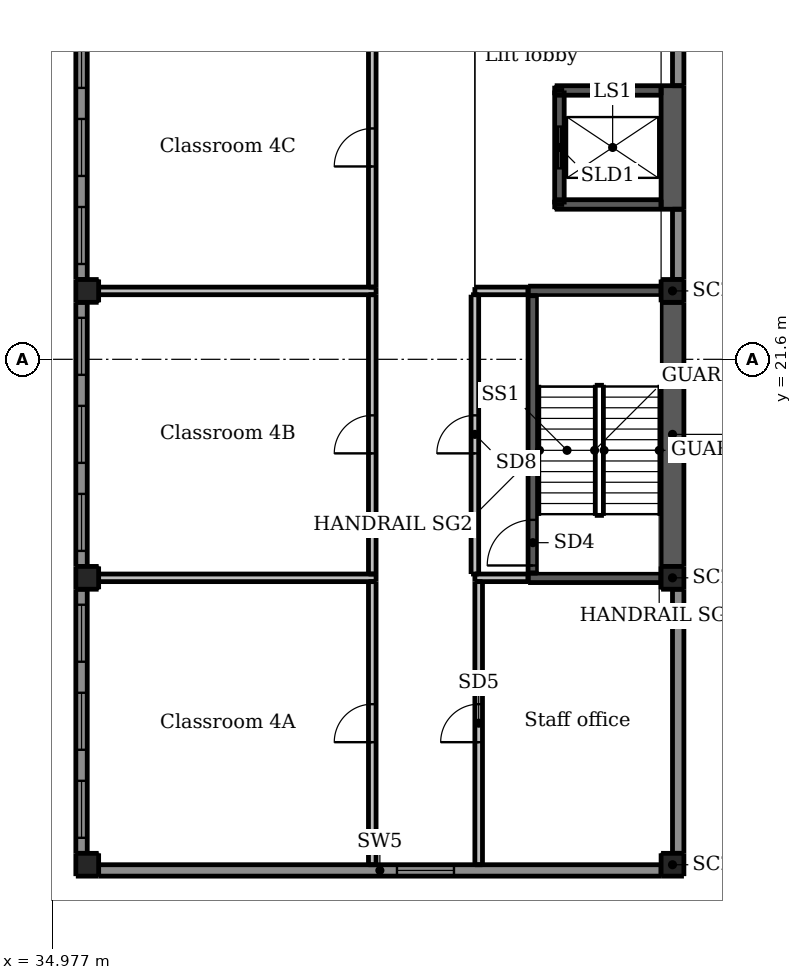
"""IFC4 building model, lengths in metres.
Left out: names, types, materials, properties, quantities, classifications, styles, units other than length and angle.
Written with IfcOpenShell. Run it as: python <this file> out.ifc"""

import sys

from ifc_helpers import new_model, si_unit, direction, frame, frame_2d, origin, origin_2d, place, context, subcontext, project, spatial, rectangle, extrude, element, fill, save


model = new_model("IFC4")
c1 = context("Model", 3, precision=1e-05, world=origin(), true_north=direction((0.0, 1.0)))
c2 = subcontext(c1, "Body", "Model", "MODEL_VIEW")
j1 = project(units=[si_unit("LENGTHUNIT", "METRE"), si_unit("PLANEANGLEUNIT", "RADIAN")], contexts=[c1])
p1 = place(None, origin())
s1 = spatial("IfcSite", under=j1, at=p1, CompositionType="ELEMENT")
p2 = place(p1, origin())
s2 = spatial("IfcBuilding", under=s1, at=p2, CompositionType="ELEMENT")
p3 = place(p2, frame((0.0, 0.0, 19.0)))
s3 = spatial("IfcBuildingStorey", under=s2, at=p3, CompositionType="ELEMENT", Elevation=19.0)
for number, where, z_axis, x_axis in (
    (1, (35.9, 8.3, -0.3), (0.0, 0.0, 1.0), (1.0, 0.0, 0.0)),
    (2, (51.3, 8.3, -0.3), (0.0, 0.0, 1.0), (1.0, 0.0, 0.0)),
    (3, (35.9, 15.85, -0.3), (0.0, 0.0, 1.0), (1.0, 0.0, 0.0)),
    (4, (51.3, 15.85, -0.3), (0.0, 0.0, 1.0), (1.0, 0.0, 0.0)),
    (5, (35.9, 23.4, -0.3), (0.0, 0.0, 1.0), (1.0, 0.0, 0.0)),
    (6, (51.3, 23.4, -0.3), (0.0, 0.0, 1.0), (1.0, 0.0, 0.0)),
):
    element("IfcColumn", number, at=place(p3, frame(where, z_axis=z_axis, x_axis=x_axis)), inside=s3, PredefinedType="COLUMN", context=c2, shape_type="SweptSolid", body=[
        extrude(rectangle(XDim=0.6, YDim=0.6, at=origin_2d()), origin(), (0.0, 0.0, 1.0), 4.35),
    ])
p4 = place(p3, frame((47.625, 15.975, -0.3), z_axis=(0.0, 0.0, 1.0), x_axis=(0.0, 1.0, 0.0)))
e7 = element("IfcWall", 7, at=p4, inside=s3, PredefinedType="SHEAR", context=c2, shape_type="SweptSolid", body=[
    extrude(rectangle(XDim=7.3, YDim=0.25, at=frame_2d((3.65, 0.0))), origin(), (0.0, 0.0, 1.0), 4.8),
])
p5 = place(p4, frame((0.2, 0.0, 0.3)))
e8 = element("IfcOpeningElement", 8, at=p5, cuts=e7, PredefinedType="OPENING", context=c2, shape_type="SweptSolid", body=[
    extrude(rectangle(XDim=1.2, YDim=2.1, at=frame_2d((0.6, 1.05))), frame((0.0, 0.135, 0.0), z_axis=(0.0, -1.0, 0.0), x_axis=(1.0, 0.0, 0.0)), (0.0, 0.0, 1.0), 0.27),
])
for number, where, z_axis, x_axis in (
    (9, (47.5, 15.85, -0.3), (0.0, 0.0, 1.0), (1.0, 0.0, 0.0)),
    (10, (47.5, 23.4, -0.3), (0.0, 0.0, 1.0), (1.0, 0.0, 0.0)),
):
    element("IfcWall", number, at=place(p3, frame(where, z_axis=z_axis, x_axis=x_axis)), inside=s3, PredefinedType="SHEAR", context=c2, shape_type="SweptSolid", body=[
        extrude(rectangle(XDim=3.5, YDim=0.25, at=frame_2d((1.75, 0.0))), origin(), (0.0, 0.0, 1.0), 4.8),
    ])
p6 = place(p3, frame((51.3, 16.15, -0.3), z_axis=(0.0, 0.0, 1.0), x_axis=(0.0, 1.0, 0.0)))
e11 = element("IfcWall", 11, at=p6, inside=s3, PredefinedType="SHEAR", context=c2, shape_type="SweptSolid", body=[
    extrude(rectangle(XDim=6.95, YDim=0.6, at=frame_2d((3.475, 0.0))), origin(), (0.0, 0.0, 1.0), 4.8),
])
p7 = place(p3, frame((48.325, 25.675, -0.3), z_axis=(0.0, 0.0, 1.0), x_axis=(0.0, 1.0, 0.0)))
e12 = element("IfcWall", 12, at=p7, inside=s3, PredefinedType="SHEAR", context=c2, shape_type="SweptSolid", body=[
    extrude(rectangle(XDim=3.0, YDim=0.25, at=frame_2d((1.5, 0.0))), origin(), (0.0, 0.0, 1.0), 4.35),
])
p8 = place(p7, frame((0.95, 0.0, 0.3)))
e13 = element("IfcOpeningElement", 13, at=p8, cuts=e12, PredefinedType="OPENING", context=c2, shape_type="SweptSolid", body=[
    extrude(rectangle(XDim=1.1, YDim=2.1, at=frame_2d((0.55, 1.05))), frame((0.0, 0.135, 0.0), z_axis=(0.0, -1.0, 0.0), x_axis=(1.0, 0.0, 0.0)), (0.0, 0.0, 1.0), 0.27),
])
for number, where, z_axis, x_axis in (
    (14, (48.2, 25.675, -0.3), (0.0, 0.0, 1.0), (1.0, 0.0, 0.0)),
    (15, (48.2, 28.675, -0.3), (0.0, 0.0, 1.0), (1.0, 0.0, 0.0)),
):
    element("IfcWall", number, at=place(p3, frame(where, z_axis=z_axis, x_axis=x_axis)), inside=s3, PredefinedType="SHEAR", context=c2, shape_type="SweptSolid", body=[
        extrude(rectangle(XDim=2.8, YDim=0.25, at=frame_2d((1.4, 0.0))), origin(), (0.0, 0.0, 1.0), 4.35),
    ])
p9 = place(p3, frame((51.3, 25.55, -0.3), z_axis=(0.0, 0.0, 1.0), x_axis=(0.0, 1.0, 0.0)))
e16 = element("IfcWall", 16, at=p9, inside=s3, PredefinedType="SHEAR", context=c2, shape_type="SweptSolid", body=[
    extrude(rectangle(XDim=3.25, YDim=0.6, at=frame_2d((1.625, 0.0))), origin(), (0.0, 0.0, 1.0), 4.35),
])
p10 = place(p3, frame((52.125, 20.0, 0.0), z_axis=(0.0, 0.0, 1.0), x_axis=(0.0, 1.0, 0.0)))
e17 = element("IfcWall", 17, at=p10, inside=s3, PredefinedType="SOLIDWALL", context=c2, shape_type="SweptSolid", body=[
    extrude(rectangle(XDim=9.8, YDim=0.25, at=frame_2d((4.9, 0.0))), origin(), (0.0, 0.0, 1.0), 4.25),
])
p11 = place(p3, frame((35.75, 8.6, 0.0), z_axis=(0.0, 0.0, 1.0), x_axis=(0.0, 1.0, 0.0)))
e18 = element("IfcWall", 18, at=p11, inside=s3, PredefinedType="SOLIDWALL", context=c2, shape_type="SweptSolid", body=[
    extrude(rectangle(XDim=6.95, YDim=0.3, at=frame_2d((3.475, 0.0))), origin(), (0.0, 0.0, 1.0), 3.15),
])
p12 = place(p11, frame((0.408, 0.0, 0.9)))
e19 = element("IfcOpeningElement", 19, at=p12, cuts=e18, PredefinedType="OPENING", context=c2, shape_type="SweptSolid", body=[
    extrude(rectangle(XDim=1.5, YDim=1.5, at=frame_2d((0.75, 0.75))), frame((0.0, 0.16, 0.0), z_axis=(0.0, -1.0, 0.0), x_axis=(1.0, 0.0, 0.0)), (0.0, 0.0, 1.0), 0.32),
])
p13 = place(p11, frame((2.725, 0.0, 0.9)))
e20 = element("IfcOpeningElement", 20, at=p13, cuts=e18, PredefinedType="OPENING", context=c2, shape_type="SweptSolid", body=[
    extrude(rectangle(XDim=1.5, YDim=1.5, at=frame_2d((0.75, 0.75))), frame((0.0, 0.16, 0.0), z_axis=(0.0, -1.0, 0.0), x_axis=(1.0, 0.0, 0.0)), (0.0, 0.0, 1.0), 0.32),
])
p14 = place(p11, frame((5.042, 0.0, 0.9)))
e21 = element("IfcOpeningElement", 21, at=p14, cuts=e18, PredefinedType="OPENING", context=c2, shape_type="SweptSolid", body=[
    extrude(rectangle(XDim=1.5, YDim=1.5, at=frame_2d((0.75, 0.75))), frame((0.0, 0.16, 0.0), z_axis=(0.0, -1.0, 0.0), x_axis=(1.0, 0.0, 0.0)), (0.0, 0.0, 1.0), 0.32),
])
p15 = place(p3, frame((35.75, 16.15, 0.0), z_axis=(0.0, 0.0, 1.0), x_axis=(0.0, 1.0, 0.0)))
e22 = element("IfcWall", 22, at=p15, inside=s3, PredefinedType="SOLIDWALL", context=c2, shape_type="SweptSolid", body=[
    extrude(rectangle(XDim=6.95, YDim=0.3, at=frame_2d((3.475, 0.0))), origin(), (0.0, 0.0, 1.0), 3.15),
])
p16 = place(p15, frame((0.408, 0.0, 0.9)))
e23 = element("IfcOpeningElement", 23, at=p16, cuts=e22, PredefinedType="OPENING", context=c2, shape_type="SweptSolid", body=[
    extrude(rectangle(XDim=1.5, YDim=1.5, at=frame_2d((0.75, 0.75))), frame((0.0, 0.16, 0.0), z_axis=(0.0, -1.0, 0.0), x_axis=(1.0, 0.0, 0.0)), (0.0, 0.0, 1.0), 0.32),
])
p17 = place(p15, frame((2.725, 0.0, 0.9)))
e24 = element("IfcOpeningElement", 24, at=p17, cuts=e22, PredefinedType="OPENING", context=c2, shape_type="SweptSolid", body=[
    extrude(rectangle(XDim=1.5, YDim=1.5, at=frame_2d((0.75, 0.75))), frame((0.0, 0.16, 0.0), z_axis=(0.0, -1.0, 0.0), x_axis=(1.0, 0.0, 0.0)), (0.0, 0.0, 1.0), 0.32),
])
p18 = place(p15, frame((5.042, 0.0, 0.9)))
e25 = element("IfcOpeningElement", 25, at=p18, cuts=e22, PredefinedType="OPENING", context=c2, shape_type="SweptSolid", body=[
    extrude(rectangle(XDim=1.5, YDim=1.5, at=frame_2d((0.75, 0.75))), frame((0.0, 0.16, 0.0), z_axis=(0.0, -1.0, 0.0), x_axis=(1.0, 0.0, 0.0)), (0.0, 0.0, 1.0), 0.32),
])
p19 = place(p3, frame((35.75, 23.7, 0.0), z_axis=(0.0, 0.0, 1.0), x_axis=(0.0, 1.0, 0.0)))
e26 = element("IfcWall", 26, at=p19, inside=s3, PredefinedType="SOLIDWALL", context=c2, shape_type="SweptSolid", body=[
    extrude(rectangle(XDim=6.95, YDim=0.3, at=frame_2d((3.475, 0.0))), origin(), (0.0, 0.0, 1.0), 3.15),
])
p20 = place(p19, frame((0.408, 0.0, 0.9)))
e27 = element("IfcOpeningElement", 27, at=p20, cuts=e26, PredefinedType="OPENING", context=c2, shape_type="SweptSolid", body=[
    extrude(rectangle(XDim=1.5, YDim=1.5, at=frame_2d((0.75, 0.75))), frame((0.0, 0.16, 0.0), z_axis=(0.0, -1.0, 0.0), x_axis=(1.0, 0.0, 0.0)), (0.0, 0.0, 1.0), 0.32),
])
p21 = place(p19, frame((2.725, 0.0, 0.9)))
e28 = element("IfcOpeningElement", 28, at=p21, cuts=e26, PredefinedType="OPENING", context=c2, shape_type="SweptSolid", body=[
    extrude(rectangle(XDim=1.5, YDim=1.5, at=frame_2d((0.75, 0.75))), frame((0.0, 0.16, 0.0), z_axis=(0.0, -1.0, 0.0), x_axis=(1.0, 0.0, 0.0)), (0.0, 0.0, 1.0), 0.32),
])
p22 = place(p19, frame((5.042, 0.0, 0.9)))
e29 = element("IfcOpeningElement", 29, at=p22, cuts=e26, PredefinedType="OPENING", context=c2, shape_type="SweptSolid", body=[
    extrude(rectangle(XDim=1.5, YDim=1.5, at=frame_2d((0.75, 0.75))), frame((0.0, 0.16, 0.0), z_axis=(0.0, -1.0, 0.0), x_axis=(1.0, 0.0, 0.0)), (0.0, 0.0, 1.0), 0.32),
])
p23 = place(p3, frame((36.2, 8.15, 0.0), z_axis=(0.0, 0.0, 1.0), x_axis=(1.0, 0.0, 0.0)))
e30 = element("IfcWall", 30, at=p23, inside=s3, PredefinedType="SOLIDWALL", context=c2, shape_type="SweptSolid", body=[
    extrude(rectangle(XDim=14.8, YDim=0.3, at=frame_2d((7.4, 0.0))), origin(), (0.0, 0.0, 1.0), 2.85),
])
p24 = place(p23, frame((7.85, 0.0, 0.9)))
e31 = element("IfcOpeningElement", 31, at=p24, cuts=e30, PredefinedType="OPENING", context=c2, shape_type="SweptSolid", body=[
    extrude(rectangle(XDim=1.5, YDim=1.5, at=frame_2d((0.75, 0.75))), frame((0.0, 0.16, 0.0), z_axis=(0.0, -1.0, 0.0), x_axis=(1.0, 0.0, 0.0)), (0.0, 0.0, 1.0), 0.32),
])
p25 = place(p3, frame((51.45, 8.6, 0.0), z_axis=(0.0, 0.0, 1.0), x_axis=(0.0, 1.0, 0.0)))
e32 = element("IfcWall", 32, at=p25, inside=s3, PredefinedType="SOLIDWALL", context=c2, shape_type="SweptSolid", body=[
    extrude(rectangle(XDim=6.95, YDim=0.3, at=frame_2d((3.475, 0.0))), origin(), (0.0, 0.0, 1.0), 3.15),
])
p26 = place(p3, frame((51.45, 23.7, 0.0), z_axis=(0.0, 0.0, 1.0), x_axis=(0.0, 1.0, 0.0)))
e33 = element("IfcWall", 33, at=p26, inside=s3, PredefinedType="SOLIDWALL", context=c2, shape_type="SweptSolid", body=[
    extrude(rectangle(XDim=1.85, YDim=0.3, at=frame_2d((0.925, 0.0))), origin(), (0.0, 0.0, 1.0), 3.15),
])
p27 = place(p3, frame((51.45, 28.8, 0.0), z_axis=(0.0, 0.0, 1.0), x_axis=(0.0, 1.0, 0.0)))
e34 = element("IfcWall", 34, at=p27, inside=s3, PredefinedType="SOLIDWALL", context=c2, shape_type="SweptSolid", body=[
    extrude(rectangle(XDim=1.85, YDim=0.3, at=frame_2d((0.925, 0.0))), origin(), (0.0, 0.0, 1.0), 3.15),
])
p28 = place(p3, frame((43.4, 8.3, 0.0), z_axis=(0.0, 0.0, 1.0), x_axis=(0.0, 1.0, 0.0)))
e35 = element("IfcWall", 35, at=p28, inside=s3, PredefinedType="PARTITIONING", context=c2, shape_type="SweptSolid", body=[
    extrude(rectangle(XDim=7.45, YDim=0.2, at=frame_2d((3.725, 0.0))), origin(), (0.0, 0.0, 1.0), 2.85),
])
p29 = place(p28, frame((3.225, 0.0, 0.0)))
e36 = element("IfcOpeningElement", 36, at=p29, cuts=e35, PredefinedType="OPENING", context=c2, shape_type="SweptSolid", body=[
    extrude(rectangle(XDim=1.0, YDim=2.1, at=frame_2d((0.5, 1.05))), frame((0.0, 0.11, 0.0), z_axis=(0.0, -1.0, 0.0), x_axis=(1.0, 0.0, 0.0)), (0.0, 0.0, 1.0), 0.22),
])
p30 = place(p3, frame((43.4, 15.95, 0.0), z_axis=(0.0, 0.0, 1.0), x_axis=(0.0, 1.0, 0.0)))
e37 = element("IfcWall", 37, at=p30, inside=s3, PredefinedType="PARTITIONING", context=c2, shape_type="SweptSolid", body=[
    extrude(rectangle(XDim=7.35, YDim=0.2, at=frame_2d((3.675, 0.0))), origin(), (0.0, 0.0, 1.0), 2.85),
])
p31 = place(p30, frame((3.175, 0.0, 0.0)))
e38 = element("IfcOpeningElement", 38, at=p31, cuts=e37, PredefinedType="OPENING", context=c2, shape_type="SweptSolid", body=[
    extrude(rectangle(XDim=1.0, YDim=2.1, at=frame_2d((0.5, 1.05))), frame((0.0, 0.11, 0.0), z_axis=(0.0, -1.0, 0.0), x_axis=(1.0, 0.0, 0.0)), (0.0, 0.0, 1.0), 0.22),
])
p32 = place(p3, frame((43.4, 23.5, 0.0), z_axis=(0.0, 0.0, 1.0), x_axis=(0.0, 1.0, 0.0)))
e39 = element("IfcWall", 39, at=p32, inside=s3, PredefinedType="PARTITIONING", context=c2, shape_type="SweptSolid", body=[
    extrude(rectangle(XDim=7.35, YDim=0.2, at=frame_2d((3.675, 0.0))), origin(), (0.0, 0.0, 1.0), 2.85),
])
p33 = place(p32, frame((3.175, 0.0, 0.0)))
e40 = element("IfcOpeningElement", 40, at=p33, cuts=e39, PredefinedType="OPENING", context=c2, shape_type="SweptSolid", body=[
    extrude(rectangle(XDim=1.0, YDim=2.1, at=frame_2d((0.5, 1.05))), frame((0.0, 0.11, 0.0), z_axis=(0.0, -1.0, 0.0), x_axis=(1.0, 0.0, 0.0)), (0.0, 0.0, 1.0), 0.22),
])
for number, where, z_axis, x_axis in (
    (41, (36.2, 15.85, 0.0), (0.0, 0.0, 1.0), (1.0, 0.0, 0.0)),
    (42, (36.2, 23.4, 0.0), (0.0, 0.0, 1.0), (1.0, 0.0, 0.0)),
):
    element("IfcWall", number, at=place(p3, frame(where, z_axis=z_axis, x_axis=x_axis)), inside=s3, PredefinedType="PARTITIONING", context=c2, shape_type="SweptSolid", body=[
        extrude(rectangle(XDim=7.3, YDim=0.2, at=frame_2d((3.65, 0.0))), origin(), (0.0, 0.0, 1.0), 2.85),
    ])
p34 = place(p3, frame((46.2, 8.3, 0.0), z_axis=(0.0, 0.0, 1.0), x_axis=(0.0, 1.0, 0.0)))
e43 = element("IfcWall", 43, at=p34, inside=s3, PredefinedType="PARTITIONING", context=c2, shape_type="SweptSolid", body=[
    extrude(rectangle(XDim=7.45, YDim=0.2, at=frame_2d((3.725, 0.0))), origin(), (0.0, 0.0, 1.0), 2.85),
])
p35 = place(p34, frame((3.225, 0.0, 0.0)))
e44 = element("IfcOpeningElement", 44, at=p35, cuts=e43, PredefinedType="OPENING", context=c2, shape_type="SweptSolid", body=[
    extrude(rectangle(XDim=1.0, YDim=2.1, at=frame_2d((0.5, 1.05))), frame((0.0, 0.11, 0.0), z_axis=(0.0, -1.0, 0.0), x_axis=(1.0, 0.0, 0.0)), (0.0, 0.0, 1.0), 0.22),
])
for number, where, z_axis, x_axis in (
    (45, (46.1, 15.85, 0.0), (0.0, 0.0, 1.0), (1.0, 0.0, 0.0)),
    (46, (46.1, 23.4, 0.0), (0.0, 0.0, 1.0), (1.0, 0.0, 0.0)),
):
    element("IfcWall", number, at=place(p3, frame(where, z_axis=z_axis, x_axis=x_axis)), inside=s3, PredefinedType="PARTITIONING", context=c2, shape_type="SweptSolid", body=[
        extrude(rectangle(XDim=1.4, YDim=0.2, at=frame_2d((0.7, 0.0))), origin(), (0.0, 0.0, 1.0), 2.85),
    ])
p36 = place(p3, frame((46.1, 15.95, 0.0), z_axis=(0.0, 0.0, 1.0), x_axis=(0.0, 1.0, 0.0)))
e47 = element("IfcWall", 47, at=p36, inside=s3, PredefinedType="PARTITIONING", context=c2, shape_type="SweptSolid", body=[
    extrude(rectangle(XDim=7.35, YDim=0.2, at=frame_2d((3.675, 0.0))), origin(), (0.0, 0.0, 1.0), 2.85),
])
p37 = place(p36, frame((3.175, 0.0, 0.0)))
e48 = element("IfcOpeningElement", 48, at=p37, cuts=e47, PredefinedType="OPENING", context=c2, shape_type="SweptSolid", body=[
    extrude(rectangle(XDim=1.0, YDim=2.1, at=frame_2d((0.5, 1.05))), frame((0.0, 0.11, 0.0), z_axis=(0.0, -1.0, 0.0), x_axis=(1.0, 0.0, 0.0)), (0.0, 0.0, 1.0), 0.22),
])
p38 = place(p12, origin())
e49 = element("IfcWindow", 49, at=p38, inside=s3, PartitioningType="DOUBLE_PANEL_HORIZONTAL", PredefinedType="WINDOW", context=c2, shape_type="SweptSolid", body=[
    extrude(rectangle(XDim=1.5, YDim=1.5, at=frame_2d((0.75, 0.75))), frame((0.0, 0.03, 0.0), z_axis=(0.0, -1.0, 0.0), x_axis=(1.0, 0.0, 0.0)), (0.0, 0.0, 1.0), 0.06),
])
fill(e19, e49)
p39 = place(p13, origin())
e50 = element("IfcWindow", 50, at=p39, inside=s3, PartitioningType="DOUBLE_PANEL_HORIZONTAL", PredefinedType="WINDOW", context=c2, shape_type="SweptSolid", body=[
    extrude(rectangle(XDim=1.5, YDim=1.5, at=frame_2d((0.75, 0.75))), frame((0.0, 0.03, 0.0), z_axis=(0.0, -1.0, 0.0), x_axis=(1.0, 0.0, 0.0)), (0.0, 0.0, 1.0), 0.06),
])
fill(e20, e50)
p40 = place(p14, origin())
e51 = element("IfcWindow", 51, at=p40, inside=s3, PartitioningType="DOUBLE_PANEL_HORIZONTAL", PredefinedType="WINDOW", context=c2, shape_type="SweptSolid", body=[
    extrude(rectangle(XDim=1.5, YDim=1.5, at=frame_2d((0.75, 0.75))), frame((0.0, 0.03, 0.0), z_axis=(0.0, -1.0, 0.0), x_axis=(1.0, 0.0, 0.0)), (0.0, 0.0, 1.0), 0.06),
])
fill(e21, e51)
p41 = place(p16, origin())
e52 = element("IfcWindow", 52, at=p41, inside=s3, PartitioningType="DOUBLE_PANEL_HORIZONTAL", PredefinedType="WINDOW", context=c2, shape_type="SweptSolid", body=[
    extrude(rectangle(XDim=1.5, YDim=1.5, at=frame_2d((0.75, 0.75))), frame((0.0, 0.03, 0.0), z_axis=(0.0, -1.0, 0.0), x_axis=(1.0, 0.0, 0.0)), (0.0, 0.0, 1.0), 0.06),
])
fill(e23, e52)
p42 = place(p17, origin())
e53 = element("IfcWindow", 53, at=p42, inside=s3, PartitioningType="DOUBLE_PANEL_HORIZONTAL", PredefinedType="WINDOW", context=c2, shape_type="SweptSolid", body=[
    extrude(rectangle(XDim=1.5, YDim=1.5, at=frame_2d((0.75, 0.75))), frame((0.0, 0.03, 0.0), z_axis=(0.0, -1.0, 0.0), x_axis=(1.0, 0.0, 0.0)), (0.0, 0.0, 1.0), 0.06),
])
fill(e24, e53)
p43 = place(p18, origin())
e54 = element("IfcWindow", 54, at=p43, inside=s3, PartitioningType="DOUBLE_PANEL_HORIZONTAL", PredefinedType="WINDOW", context=c2, shape_type="SweptSolid", body=[
    extrude(rectangle(XDim=1.5, YDim=1.5, at=frame_2d((0.75, 0.75))), frame((0.0, 0.03, 0.0), z_axis=(0.0, -1.0, 0.0), x_axis=(1.0, 0.0, 0.0)), (0.0, 0.0, 1.0), 0.06),
])
fill(e25, e54)
p44 = place(p20, origin())
e55 = element("IfcWindow", 55, at=p44, inside=s3, PartitioningType="DOUBLE_PANEL_HORIZONTAL", PredefinedType="WINDOW", context=c2, shape_type="SweptSolid", body=[
    extrude(rectangle(XDim=1.5, YDim=1.5, at=frame_2d((0.75, 0.75))), frame((0.0, 0.03, 0.0), z_axis=(0.0, -1.0, 0.0), x_axis=(1.0, 0.0, 0.0)), (0.0, 0.0, 1.0), 0.06),
])
fill(e27, e55)
p45 = place(p21, origin())
e56 = element("IfcWindow", 56, at=p45, inside=s3, PartitioningType="DOUBLE_PANEL_HORIZONTAL", PredefinedType="WINDOW", context=c2, shape_type="SweptSolid", body=[
    extrude(rectangle(XDim=1.5, YDim=1.5, at=frame_2d((0.75, 0.75))), frame((0.0, 0.03, 0.0), z_axis=(0.0, -1.0, 0.0), x_axis=(1.0, 0.0, 0.0)), (0.0, 0.0, 1.0), 0.06),
])
fill(e28, e56)
p46 = place(p22, origin())
e57 = element("IfcWindow", 57, at=p46, inside=s3, PartitioningType="DOUBLE_PANEL_HORIZONTAL", PredefinedType="WINDOW", context=c2, shape_type="SweptSolid", body=[
    extrude(rectangle(XDim=1.5, YDim=1.5, at=frame_2d((0.75, 0.75))), frame((0.0, 0.03, 0.0), z_axis=(0.0, -1.0, 0.0), x_axis=(1.0, 0.0, 0.0)), (0.0, 0.0, 1.0), 0.06),
])
fill(e29, e57)
p47 = place(p24, origin())
e58 = element("IfcWindow", 58, at=p47, inside=s3, PartitioningType="DOUBLE_PANEL_HORIZONTAL", PredefinedType="WINDOW", context=c2, shape_type="SweptSolid", body=[
    extrude(rectangle(XDim=1.5, YDim=1.5, at=frame_2d((0.75, 0.75))), frame((0.0, 0.03, 0.0), z_axis=(0.0, -1.0, 0.0), x_axis=(1.0, 0.0, 0.0)), (0.0, 0.0, 1.0), 0.06),
])
fill(e31, e58)
p48 = place(p29, origin())
e59 = element("IfcDoor", 59, at=p48, inside=s3, OperationType="SINGLE_SWING_LEFT", PredefinedType="DOOR", context=c2, shape_type="SweptSolid", body=[
    extrude(rectangle(XDim=1.0, YDim=2.1, at=frame_2d((0.5, 1.05))), frame((0.0, 0.025, 0.0), z_axis=(0.0, -1.0, 0.0), x_axis=(1.0, 0.0, 0.0)), (0.0, 0.0, 1.0), 0.05),
])
fill(e36, e59)
p49 = place(p31, origin())
e60 = element("IfcDoor", 60, at=p49, inside=s3, OperationType="SINGLE_SWING_LEFT", PredefinedType="DOOR", context=c2, shape_type="SweptSolid", body=[
    extrude(rectangle(XDim=1.0, YDim=2.1, at=frame_2d((0.5, 1.05))), frame((0.0, 0.025, 0.0), z_axis=(0.0, -1.0, 0.0), x_axis=(1.0, 0.0, 0.0)), (0.0, 0.0, 1.0), 0.05),
])
fill(e38, e60)
p50 = place(p33, origin())
e61 = element("IfcDoor", 61, at=p50, inside=s3, OperationType="SINGLE_SWING_LEFT", PredefinedType="DOOR", context=c2, shape_type="SweptSolid", body=[
    extrude(rectangle(XDim=1.0, YDim=2.1, at=frame_2d((0.5, 1.05))), frame((0.0, 0.025, 0.0), z_axis=(0.0, -1.0, 0.0), x_axis=(1.0, 0.0, 0.0)), (0.0, 0.0, 1.0), 0.05),
])
fill(e40, e61)
p51 = place(p35, origin())
e62 = element("IfcDoor", 62, at=p51, inside=s3, OperationType="SINGLE_SWING_LEFT", PredefinedType="DOOR", context=c2, shape_type="SweptSolid", body=[
    extrude(rectangle(XDim=1.0, YDim=2.1, at=frame_2d((0.5, 1.05))), frame((0.0, 0.025, 0.0), z_axis=(0.0, -1.0, 0.0), x_axis=(1.0, 0.0, 0.0)), (0.0, 0.0, 1.0), 0.05),
])
fill(e44, e62)
p52 = place(p37, origin())
e63 = element("IfcDoor", 63, at=p52, inside=s3, OperationType="SINGLE_SWING_LEFT", PredefinedType="DOOR", context=c2, shape_type="SweptSolid", body=[
    extrude(rectangle(XDim=1.0, YDim=2.1, at=frame_2d((0.5, 1.05))), frame((0.0, 0.025, 0.0), z_axis=(0.0, -1.0, 0.0), x_axis=(1.0, 0.0, 0.0)), (0.0, 0.0, 1.0), 0.05),
])
fill(e48, e63)
p53 = place(p5, origin())
e64 = element("IfcDoor", 64, at=p53, inside=s3, OperationType="SINGLE_SWING_LEFT", PredefinedType="DOOR", context=c2, shape_type="SweptSolid", body=[
    extrude(rectangle(XDim=1.2, YDim=2.1, at=frame_2d((0.6, 1.05))), frame((0.0, 0.025, 0.0), z_axis=(0.0, -1.0, 0.0), x_axis=(1.0, 0.0, 0.0)), (0.0, 0.0, 1.0), 0.05),
])
fill(e8, e64)
p54 = place(p8, origin())
e65 = element("IfcDoor", 65, at=p54, inside=s3, OperationType="SLIDING_TO_LEFT", PredefinedType="DOOR", context=c2, shape_type="SweptSolid", body=[
    extrude(rectangle(XDim=1.1, YDim=2.1, at=frame_2d((0.55, 1.05))), frame((0.0, 0.025, 0.0), z_axis=(0.0, -1.0, 0.0), x_axis=(1.0, 0.0, 0.0)), (0.0, 0.0, 1.0), 0.05),
])
fill(e13, e65)
save(model, sys.argv[1])
